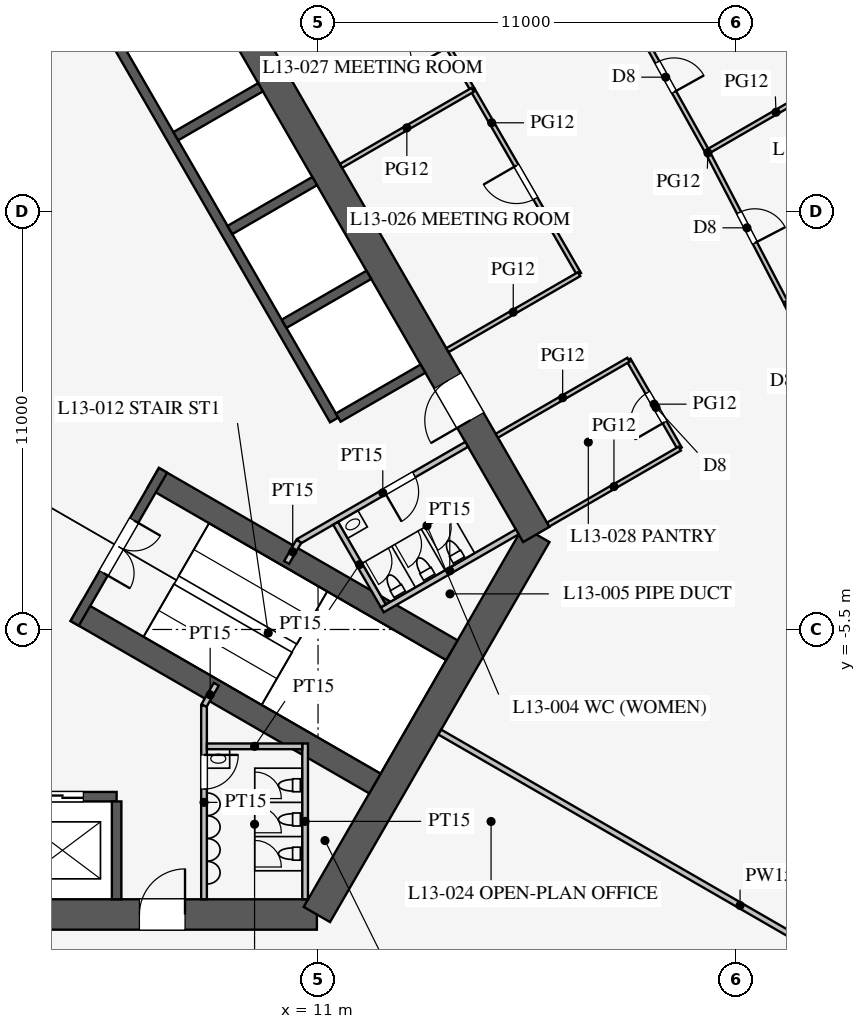
"""IFC4 building model, lengths in metres.
Left out: names, types, materials, properties, quantities, classifications, styles, units other than length and angle.
Written with IfcOpenShell. Run it as: python <this file> out.ifc"""

import sys

from ifc_helpers import new_model, si_unit, direction, frame, frame_2d, origin, place, context, subcontext, project, spatial, rectangle, extrude, element, fill, save


model = new_model("IFC4")
c1 = context("Model", 3, precision=1e-05, world=origin(), true_north=direction((0.0, 1.0)))
c2 = subcontext(c1, "Body", "Model", "MODEL_VIEW")
j1 = project(units=[si_unit("LENGTHUNIT", "METRE"), si_unit("PLANEANGLEUNIT", "RADIAN")], contexts=[c1])
p1 = place(None, origin())
s1 = spatial("IfcSite", under=j1, at=p1, CompositionType="ELEMENT")
p2 = place(p1, origin())
s2 = spatial("IfcBuilding", under=s1, at=p2, CompositionType="ELEMENT")
p3 = place(p2, frame((0.0, 0.0, 58.5)))
s3 = spatial("IfcBuildingStorey", under=s2, at=p3, CompositionType="ELEMENT", Elevation=58.5)
p4 = place(p3, frame((-10.97, -13.0, 0.0), z_axis=(0.0, 0.0, 1.0), x_axis=(1.0, 0.0, 0.0)))
e1 = element("IfcWall", 1, at=p4, inside=s3, PredefinedType="SHEAR", context=c2, shape_type="SweptSolid", body=[
    extrude(rectangle(XDim=21.939, YDim=0.8, at=frame_2d((10.97, 0.0))), origin(), (0.0, 0.0, 1.0), 4.2),
])
p5 = place(p4, frame((17.27, 0.0, 0.0)))
e2 = element("IfcOpeningElement", 2, at=p5, cuts=e1, PredefinedType="OPENING", context=c2, shape_type="SweptSolid", body=[
    extrude(rectangle(XDim=1.2, YDim=2.1, at=frame_2d((0.6, 1.05))), frame((0.0, 0.41, 0.0), z_axis=(0.0, -1.0, 0.0), x_axis=(1.0, 0.0, 0.0)), (0.0, 0.0, 1.0), 0.82),
])
p6 = place(p4, frame((3.47, 0.0, 0.0)))
e3 = element("IfcOpeningElement", 3, at=p6, cuts=e1, PredefinedType="OPENING", context=c2, shape_type="SweptSolid", body=[
    extrude(rectangle(XDim=1.2, YDim=2.1, at=frame_2d((0.6, 1.05))), frame((0.0, 0.41, 0.0), z_axis=(0.0, -1.0, 0.0), x_axis=(1.0, 0.0, 0.0)), (0.0, 0.0, 1.0), 0.82),
])
p7 = place(p3, frame((10.97, -13.0, 0.0), z_axis=(0.0, 0.0, 1.0), x_axis=(0.499995765644, 0.866027848477, 0.0)))
e4 = element("IfcWall", 4, at=p7, inside=s3, PredefinedType="SHEAR", context=c2, shape_type="SweptSolid", body=[
    extrude(rectangle(XDim=11.547, YDim=0.8, at=frame_2d((5.773, 0.0))), origin(), (0.0, 0.0, 1.0), 4.2),
])
p8 = place(p3, frame((16.743, -3.0, 0.0), z_axis=(0.0, 0.0, 1.0), x_axis=(-0.500002442456, 0.866023993627, 0.0)))
e5 = element("IfcWall", 5, at=p8, inside=s3, PredefinedType="SHEAR", context=c2, shape_type="SweptSolid", body=[
    extrude(rectangle(XDim=21.939, YDim=0.8, at=frame_2d((10.97, 0.0))), origin(), (0.0, 0.0, 1.0), 4.2),
])
p9 = place(p8, frame((17.27, 0.0, 0.0)))
e6 = element("IfcOpeningElement", 6, at=p9, cuts=e5, PredefinedType="OPENING", context=c2, shape_type="SweptSolid", body=[
    extrude(rectangle(XDim=1.2, YDim=2.1, at=frame_2d((0.6, 1.05))), frame((0.0, 0.41, 0.0), z_axis=(0.0, -1.0, 0.0), x_axis=(1.0, 0.0, 0.0)), (0.0, 0.0, 1.0), 0.82),
])
p10 = place(p8, frame((3.47, 0.0, 0.0)))
e7 = element("IfcOpeningElement", 7, at=p10, cuts=e5, PredefinedType="OPENING", context=c2, shape_type="SweptSolid", body=[
    extrude(rectangle(XDim=1.2, YDim=2.1, at=frame_2d((0.6, 1.05))), frame((0.0, 0.41, 0.0), z_axis=(0.0, -1.0, 0.0), x_axis=(1.0, 0.0, 0.0)), (0.0, 0.0, 1.0), 0.82),
])
p11 = place(p3, frame((-5.7, -9.9, 0.0), z_axis=(0.0, 0.0, 1.0), x_axis=(1.0, 0.0, 0.0)))
e8 = element("IfcWall", 8, at=p11, inside=s3, PredefinedType="SHEAR", context=c2, shape_type="SweptSolid", body=[
    extrude(rectangle(XDim=11.4, YDim=0.25, at=frame_2d((5.7, 0.0))), origin(), (0.0, 0.0, 1.0), 4.2),
])
p12 = place(p11, frame((0.875, 0.0, 0.0)))
e9 = element("IfcOpeningElement", 9, at=p12, cuts=e8, PredefinedType="OPENING", context=c2, shape_type="SweptSolid", body=[
    extrude(rectangle(XDim=1.1, YDim=2.2, at=frame_2d((0.55, 1.1))), frame((0.0, 0.135, 0.0), z_axis=(0.0, -1.0, 0.0), x_axis=(1.0, 0.0, 0.0)), (0.0, 0.0, 1.0), 0.27),
])
p13 = place(p11, frame((3.725, 0.0, 0.0)))
e10 = element("IfcOpeningElement", 10, at=p13, cuts=e8, PredefinedType="OPENING", context=c2, shape_type="SweptSolid", body=[
    extrude(rectangle(XDim=1.1, YDim=2.2, at=frame_2d((0.55, 1.1))), frame((0.0, 0.135, 0.0), z_axis=(0.0, -1.0, 0.0), x_axis=(1.0, 0.0, 0.0)), (0.0, 0.0, 1.0), 0.27),
])
p14 = place(p11, frame((6.575, 0.0, 0.0)))
e11 = element("IfcOpeningElement", 11, at=p14, cuts=e8, PredefinedType="OPENING", context=c2, shape_type="SweptSolid", body=[
    extrude(rectangle(XDim=1.1, YDim=2.2, at=frame_2d((0.55, 1.1))), frame((0.0, 0.135, 0.0), z_axis=(0.0, -1.0, 0.0), x_axis=(1.0, 0.0, 0.0)), (0.0, 0.0, 1.0), 0.27),
])
p15 = place(p11, frame((9.425, 0.0, 0.0)))
e12 = element("IfcOpeningElement", 12, at=p15, cuts=e8, PredefinedType="OPENING", context=c2, shape_type="SweptSolid", body=[
    extrude(rectangle(XDim=1.1, YDim=2.2, at=frame_2d((0.55, 1.1))), frame((0.0, 0.135, 0.0), z_axis=(0.0, -1.0, 0.0), x_axis=(1.0, 0.0, 0.0)), (0.0, 0.0, 1.0), 0.27),
])
p16 = place(p3, frame((5.7, -10.025, 0.0), z_axis=(0.0, 0.0, 1.0), x_axis=(0.0, -1.0, 0.0)))
e13 = element("IfcWall", 13, at=p16, inside=s3, PredefinedType="SHEAR", context=c2, shape_type="SweptSolid", body=[
    extrude(rectangle(XDim=2.575, YDim=0.25, at=frame_2d((1.288, 0.0))), origin(), (0.0, 0.0, 1.0), 4.2),
])
p17 = place(p3, frame((11.424, 0.014, 0.0), z_axis=(0.0, 0.0, 1.0), x_axis=(-0.500001763848, 0.866024385424, 0.0)))
e14 = element("IfcWall", 14, at=p17, inside=s3, PredefinedType="SHEAR", context=c2, shape_type="SweptSolid", body=[
    extrude(rectangle(XDim=11.4, YDim=0.25, at=frame_2d((5.7, 0.0))), origin(), (0.0, 0.0, 1.0), 4.2),
])
for number, where, z_axis, x_axis in (
    (15, (11.532, 0.076, 0.0), (0.0, 0.0, 1.0), (0.866, 0.5, 0.0)),
    (16, (10.107, 2.544, 0.0), (0.0, 0.0, 1.0), (0.866, 0.5, 0.0)),
    (17, (8.682, 5.012, 0.0), (0.0, 0.0, 1.0), (0.866, 0.5, 0.0)),
    (18, (7.257, 7.481, 0.0), (0.0, 0.0, 1.0), (0.866, 0.5, 0.0)),
):
    element("IfcWall", number, at=place(p3, frame(where, z_axis=z_axis, x_axis=x_axis)), inside=s3, PredefinedType="SHEAR", context=c2, shape_type="SweptSolid", body=[
        extrude(rectangle(XDim=2.575, YDim=0.25, at=frame_2d((1.288, 0.0))), origin(), (0.0, 0.0, 1.0), 4.2),
    ])
for number, where, z_axis, x_axis in (
    (19, (4.638, -5.016, 0.0), (0.0, 0.0, 1.0), (0.866, -0.5, 0.0)),
    (20, (6.663, -1.509, 0.0), (0.0, 0.0, 1.0), (0.866, -0.5, 0.0)),
):
    element("IfcWall", number, at=place(p3, frame(where, z_axis=z_axis, x_axis=x_axis)), inside=s3, PredefinedType="SHEAR", context=c2, shape_type="SweptSolid", body=[
        extrude(rectangle(XDim=9.075, YDim=0.6, at=frame_2d((4.538, 0.0))), origin(), (0.0, 0.0, 1.0), 4.2),
    ])
p18 = place(p3, frame((4.597, -5.339, 0.0), z_axis=(0.0, 0.0, 1.0), x_axis=(0.499984536904, 0.866034331223, 0.0)))
e21 = element("IfcWall", 21, at=p18, inside=s3, PredefinedType="SHEAR", context=c2, shape_type="SweptSolid", body=[
    extrude(rectangle(XDim=4.65, YDim=0.25, at=frame_2d((2.325, 0.0))), origin(), (0.0, 0.0, 1.0), 4.2),
])
p19 = place(p18, frame((1.525, 0.0, 0.0)))
e22 = element("IfcOpeningElement", 22, at=p19, cuts=e21, PredefinedType="OPENING", context=c2, shape_type="SweptSolid", body=[
    extrude(rectangle(XDim=1.6, YDim=2.1, at=frame_2d((0.8, 1.05))), frame((0.0, 0.135, 0.0), z_axis=(0.0, -1.0, 0.0), x_axis=(1.0, 0.0, 0.0)), (0.0, 0.0, 1.0), 0.27),
])
p20 = place(p3, frame((8.0, -7.5, 0.0), z_axis=(0.0, 0.0, 1.0), x_axis=(0.0, -1.0, 0.0)))
e23 = element("IfcWall", 23, at=p20, inside=s3, PredefinedType="PARTITIONING", context=c2, shape_type="SweptSolid", body=[
    extrude(rectangle(XDim=5.1, YDim=0.15, at=frame_2d((2.55, 0.0))), origin(), (0.0, 0.0, 1.0), 4.0),
])
p21 = place(p20, frame((1.3, 0.0, 0.0)))
e24 = element("IfcOpeningElement", 24, at=p21, cuts=e23, PredefinedType="OPENING", context=c2, shape_type="SweptSolid", body=[
    extrude(rectangle(XDim=0.9, YDim=2.1, at=frame_2d((0.45, 1.05))), frame((0.0, 0.085, 0.0), z_axis=(0.0, -1.0, 0.0), x_axis=(1.0, 0.0, 0.0)), (0.0, 0.0, 1.0), 0.17),
])
p22 = place(p3, frame((10.495, -3.178, 0.0), z_axis=(0.0, 0.0, 1.0), x_axis=(0.86602216432, 0.500005610874, 0.0)))
e25 = element("IfcWall", 25, at=p22, inside=s3, PredefinedType="PARTITIONING", context=c2, shape_type="SweptSolid", body=[
    extrude(rectangle(XDim=5.1, YDim=0.15, at=frame_2d((2.55, 0.0))), origin(), (0.0, 0.0, 1.0), 4.0),
])
p23 = place(p22, frame((2.6, 0.0, 0.0)))
e26 = element("IfcOpeningElement", 26, at=p23, cuts=e25, PredefinedType="OPENING", context=c2, shape_type="SweptSolid", body=[
    extrude(rectangle(XDim=0.9, YDim=2.1, at=frame_2d((0.45, 1.05))), frame((0.0, 0.085, 0.0), z_axis=(0.0, -1.0, 0.0), x_axis=(1.0, 0.0, 0.0)), (0.0, 0.0, 1.0), 0.17),
])
for number, where, z_axis, x_axis in (
    (27, (8.0, -7.5, 0.0), (0.0, 0.0, 1.0), (0.5, 0.866, 0.0)),
    (28, (10.495, -3.178, 0.0), (0.0, 0.0, 1.0), (-0.5, -0.866, 0.0)),
):
    element("IfcWall", number, at=place(p3, frame(where, z_axis=z_axis, x_axis=x_axis)), inside=s3, PredefinedType="PARTITIONING", context=c2, shape_type="SweptSolid", body=[
        extrude(rectangle(XDim=0.645, YDim=0.15, at=frame_2d((0.323, 0.0))), origin(), (0.0, 0.0, 1.0), 4.0),
    ])
p24 = place(p3, frame((10.66, -8.5, 0.0), z_axis=(0.0, 0.0, 1.0), x_axis=(0.0, -1.0, 0.0)))
e29 = element("IfcWall", 29, at=p24, inside=s3, PredefinedType="PARTITIONING", context=c2, shape_type="SweptSolid", body=[
    extrude(rectangle(XDim=4.1, YDim=0.15, at=frame_2d((2.05, 0.0))), origin(), (0.0, 0.0, 1.0), 4.0),
])
p25 = place(p3, frame((8.075, -8.575, 0.0), z_axis=(0.0, 0.0, 1.0), x_axis=(1.0, 0.0, 0.0)))
e30 = element("IfcWall", 30, at=p25, inside=s3, PredefinedType="PARTITIONING", context=c2, shape_type="SweptSolid", body=[
    extrude(rectangle(XDim=2.51, YDim=0.15, at=frame_2d((1.255, 0.0))), origin(), (0.0, 0.0, 1.0), 4.0),
])
p26 = place(p3, frame((12.691, -4.982, 0.0), z_axis=(0.0, 0.0, 1.0), x_axis=(0.8660249478, 0.500000789788, 0.0)))
e31 = element("IfcWall", 31, at=p26, inside=s3, PredefinedType="PARTITIONING", context=c2, shape_type="SweptSolid", body=[
    extrude(rectangle(XDim=4.1, YDim=0.15, at=frame_2d((2.05, 0.0))), origin(), (0.0, 0.0, 1.0), 4.0),
])
p27 = place(p3, frame((11.464, -2.706, 0.0), z_axis=(0.0, 0.0, 1.0), x_axis=(0.50001992892, -0.866013897511, 0.0)))
e32 = element("IfcWall", 32, at=p27, inside=s3, PredefinedType="PARTITIONING", context=c2, shape_type="SweptSolid", body=[
    extrude(rectangle(XDim=2.51, YDim=0.15, at=frame_2d((1.255, 0.0))), origin(), (0.0, 0.0, 1.0), 4.0),
])
p28 = place(p3, frame((14.203, -8.2, 0.0), z_axis=(0.0, 0.0, 1.0), x_axis=(0.866024965723, -0.500000758745, 0.0)))
e33 = element("IfcWall", 33, at=p28, inside=s3, PredefinedType="PARTITIONING", context=c2, shape_type="SweptSolid", body=[
    extrude(rectangle(XDim=18.25, YDim=0.15, at=frame_2d((9.125, 0.0))), origin(), (0.0, 0.0, 1.0), 2.3),
])
p29 = place(p3, frame((15.069, 8.7, 0.0), z_axis=(0.0, 0.0, 1.0), x_axis=(-0.500012057535, 0.866018442252, 0.0)))
e34 = element("IfcWall", 34, at=p29, inside=s3, PredefinedType="PARTITIONING", context=c2, shape_type="SweptSolid", body=[
    extrude(rectangle(XDim=3.6, YDim=0.12, at=frame_2d((1.8, 0.0))), origin(), (0.0, 0.0, 1.0), 2.9),
])
p30 = place(p29, frame((1.3, 0.0, 0.15)))
e35 = element("IfcOpeningElement", 35, at=p30, cuts=e34, PredefinedType="OPENING", context=c2, shape_type="SweptSolid", body=[
    extrude(rectangle(XDim=1.0, YDim=2.1, at=frame_2d((0.5, 1.05))), frame((0.0, 0.07, 0.0), z_axis=(0.0, -1.0, 0.0), x_axis=(1.0, 0.0, 0.0)), (0.0, 0.0, 1.0), 0.14),
])
p31 = place(p3, frame((20.519, -0.74, 0.0), z_axis=(0.0, 0.0, 1.0), x_axis=(-0.4999416173, 0.866059108428, 0.0)))
e36 = element("IfcWall", 36, at=p31, inside=s3, PredefinedType="PARTITIONING", context=c2, shape_type="SweptSolid", body=[
    extrude(rectangle(XDim=2.7, YDim=0.12, at=frame_2d((1.35, 0.0))), origin(), (0.0, 0.0, 1.0), 2.9),
])
p32 = place(p31, frame((0.8, 0.0, 0.15)))
e37 = element("IfcOpeningElement", 37, at=p32, cuts=e36, PredefinedType="OPENING", context=c2, shape_type="SweptSolid", body=[
    extrude(rectangle(XDim=0.9, YDim=2.1, at=frame_2d((0.45, 1.05))), frame((0.0, 0.07, 0.0), z_axis=(0.0, -1.0, 0.0), x_axis=(1.0, 0.0, 0.0)), (0.0, 0.0, 1.0), 0.14),
])
p33 = place(p3, frame((17.869, 3.85, 0.0), z_axis=(0.0, 0.0, 1.0), x_axis=(-0.500016814911, 0.866015695474, 0.0)))
e38 = element("IfcWall", 38, at=p33, inside=s3, PredefinedType="PARTITIONING", context=c2, shape_type="SweptSolid", body=[
    extrude(rectangle(XDim=5.6, YDim=0.12, at=frame_2d((2.8, 0.0))), origin(), (0.0, 0.0, 1.0), 2.9),
])
p34 = place(p33, frame((2.3, 0.0, 0.15)))
e39 = element("IfcOpeningElement", 39, at=p34, cuts=e38, PredefinedType="OPENING", context=c2, shape_type="SweptSolid", body=[
    extrude(rectangle(XDim=1.0, YDim=2.1, at=frame_2d((0.5, 1.05))), frame((0.0, 0.07, 0.0), z_axis=(0.0, -1.0, 0.0), x_axis=(1.0, 0.0, 0.0)), (0.0, 0.0, 1.0), 0.14),
])
p35 = place(p3, frame((11.605, 6.7, 0.0), z_axis=(0.0, 0.0, 1.0), x_axis=(0.866026010844, 0.49999894854, 0.0)))
e40 = element("IfcWall", 40, at=p35, inside=s3, PredefinedType="PARTITIONING", context=c2, shape_type="SweptSolid", body=[
    extrude(rectangle(XDim=4.0, YDim=0.12, at=frame_2d((2.0, 0.0))), origin(), (0.0, 0.0, 1.0), 2.8),
])
for number, where, z_axis, x_axis in (
    (41, (17.055, -2.74, 0.0), (0.0, 0.0, 1.0), (0.866, 0.5, 0.0)),
    (42, (14.405, 1.85, 0.0), (0.0, 0.0, 1.0), (0.866, 0.5, 0.0)),
    (43, (15.705, -0.401, 0.0), (0.0, 0.0, 1.0), (0.866, 0.5, 0.0)),
):
    element("IfcWall", number, at=place(p3, frame(where, z_axis=z_axis, x_axis=x_axis)), inside=s3, PredefinedType="PARTITIONING", context=c2, shape_type="SweptSolid", body=[
        extrude(rectangle(XDim=4.0, YDim=0.12, at=frame_2d((2.0, 0.0))), origin(), (0.0, 0.0, 1.0), 2.9),
    ])
p36 = place(p3, frame((25.292, -0.986, 0.0), z_axis=(0.0, 0.0, 1.0), x_axis=(-0.435857917556, 0.900015486369, 0.0)))
e44 = element("IfcWall", 44, at=p36, inside=s3, PredefinedType="PARTITIONING", context=c2, shape_type="SweptSolid", body=[
    extrude(rectangle(XDim=4.512, YDim=0.12, at=frame_2d((2.256, 0.0))), origin(), (0.0, 0.0, 1.0), 2.9),
])
p37 = place(p36, frame((1.8, 0.0, 0.15)))
e45 = element("IfcOpeningElement", 45, at=p37, cuts=e44, PredefinedType="OPENING", context=c2, shape_type="SweptSolid", body=[
    extrude(rectangle(XDim=0.9, YDim=2.1, at=frame_2d((0.45, 1.05))), frame((0.0, 0.07, 0.0), z_axis=(0.0, -1.0, 0.0), x_axis=(1.0, 0.0, 0.0)), (0.0, 0.0, 1.0), 0.14),
])
p38 = place(p3, frame((21.245, 7.07, 0.0), z_axis=(0.0, 0.0, 1.0), x_axis=(-0.487373854787, 0.873193406795, 0.0)))
e46 = element("IfcWall", 46, at=p38, inside=s3, PredefinedType="PARTITIONING", context=c2, shape_type="SweptSolid", body=[
    extrude(rectangle(XDim=4.5, YDim=0.12, at=frame_2d((2.25, 0.0))), origin(), (0.0, 0.0, 1.0), 2.9),
])
p39 = place(p38, frame((1.8, 0.0, 0.15)))
e47 = element("IfcOpeningElement", 47, at=p39, cuts=e46, PredefinedType="OPENING", context=c2, shape_type="SweptSolid", body=[
    extrude(rectangle(XDim=0.9, YDim=2.1, at=frame_2d((0.45, 1.05))), frame((0.0, 0.07, 0.0), z_axis=(0.0, -1.0, 0.0), x_axis=(1.0, 0.0, 0.0)), (0.0, 0.0, 1.0), 0.14),
])
p40 = place(p3, frame((23.325, 3.074, 0.0), z_axis=(0.0, 0.0, 1.0), x_axis=(-0.461852697957, 0.886956642339, 0.0)))
e48 = element("IfcWall", 48, at=p40, inside=s3, PredefinedType="PARTITIONING", context=c2, shape_type="SweptSolid", body=[
    extrude(rectangle(XDim=4.504, YDim=0.12, at=frame_2d((2.252, 0.0))), origin(), (0.0, 0.0, 1.0), 2.9),
])
p41 = place(p40, frame((1.8, 0.0, 0.15)))
e49 = element("IfcOpeningElement", 49, at=p41, cuts=e48, PredefinedType="OPENING", context=c2, shape_type="SweptSolid", body=[
    extrude(rectangle(XDim=0.9, YDim=2.1, at=frame_2d((0.45, 1.05))), frame((0.0, 0.07, 0.0), z_axis=(0.0, -1.0, 0.0), x_axis=(1.0, 0.0, 0.0)), (0.0, 0.0, 1.0), 0.14),
])
p42 = place(p3, frame((21.245, 7.07, 0.0), z_axis=(0.0, 0.0, 1.0), x_axis=(0.866025669538, 0.499999539701, 0.0)))
e50 = element("IfcWall", 50, at=p42, inside=s3, PredefinedType="PARTITIONING", context=c2, shape_type="SweptSolid", body=[
    extrude(rectangle(XDim=4.169, YDim=0.12, at=frame_2d((2.085, 0.0))), origin(), (0.0, 0.0, 1.0), 2.8),
])
p43 = place(p3, frame((23.325, 3.074, 0.0), z_axis=(0.0, 0.0, 1.0), x_axis=(0.866009971343, 0.50002672882, 0.0)))
e51 = element("IfcWall", 51, at=p43, inside=s3, PredefinedType="PARTITIONING", context=c2, shape_type="SweptSolid", body=[
    extrude(rectangle(XDim=4.167, YDim=0.12, at=frame_2d((2.083, 0.0))), origin(), (0.0, 0.0, 1.0), 2.8),
])
p44 = place(p21, origin())
e52 = element("IfcDoor", 52, at=p44, inside=s3, OperationType="SINGLE_SWING_LEFT", PredefinedType="DOOR", context=c2, shape_type="SweptSolid", body=[
    extrude(rectangle(XDim=0.9, YDim=2.1, at=frame_2d((0.45, 1.05))), frame((0.0, 0.025, 0.0), z_axis=(0.0, -1.0, 0.0), x_axis=(1.0, 0.0, 0.0)), (0.0, 0.0, 1.0), 0.05),
])
fill(e24, e52)
p45 = place(p23, frame((0.9, 0.0, 0.0), z_axis=(0.0, 0.0, 1.0), x_axis=(-1.0, 0.0, 0.0)))
e53 = element("IfcDoor", 53, at=p45, inside=s3, OperationType="SINGLE_SWING_RIGHT", PredefinedType="DOOR", context=c2, shape_type="SweptSolid", body=[
    extrude(rectangle(XDim=0.9, YDim=2.1, at=frame_2d((0.45, 1.05))), frame((0.0, 0.025, 0.0), z_axis=(0.0, -1.0, 0.0), x_axis=(1.0, 0.0, 0.0)), (0.0, 0.0, 1.0), 0.05),
])
fill(e26, e53)
p46 = place(p19, frame((1.6, 0.0, 0.0), z_axis=(0.0, 0.0, 1.0), x_axis=(-1.0, 0.0, 0.0)))
e54 = element("IfcDoor", 54, at=p46, inside=s3, OperationType="DOUBLE_DOOR_SINGLE_SWING", PredefinedType="DOOR", context=c2, shape_type="SweptSolid", body=[
    extrude(rectangle(XDim=1.6, YDim=2.1, at=frame_2d((0.8, 1.05))), frame((0.0, 0.025, 0.0), z_axis=(0.0, -1.0, 0.0), x_axis=(1.0, 0.0, 0.0)), (0.0, 0.0, 1.0), 0.05),
])
fill(e22, e54)
p47 = place(p5, origin())
e55 = element("IfcDoor", 55, at=p47, inside=s3, OperationType="SINGLE_SWING_RIGHT", PredefinedType="DOOR", context=c2, shape_type="SweptSolid", body=[
    extrude(rectangle(XDim=1.2, YDim=2.1, at=frame_2d((0.6, 1.05))), frame((0.0, 0.025, 0.0), z_axis=(0.0, -1.0, 0.0), x_axis=(1.0, 0.0, 0.0)), (0.0, 0.0, 1.0), 0.05),
])
fill(e2, e55)
p48 = place(p10, origin())
e56 = element("IfcDoor", 56, at=p48, inside=s3, OperationType="SINGLE_SWING_LEFT", PredefinedType="DOOR", context=c2, shape_type="SweptSolid", body=[
    extrude(rectangle(XDim=1.2, YDim=2.1, at=frame_2d((0.6, 1.05))), frame((0.0, 0.025, 0.0), z_axis=(0.0, -1.0, 0.0), x_axis=(1.0, 0.0, 0.0)), (0.0, 0.0, 1.0), 0.05),
])
fill(e7, e56)
p49 = place(p34, origin())
e57 = element("IfcDoor", 57, at=p49, inside=s3, OperationType="SINGLE_SWING_RIGHT", PredefinedType="DOOR", context=c2, shape_type="SweptSolid", body=[
    extrude(rectangle(XDim=1.0, YDim=2.1, at=frame_2d((0.5, 1.05))), frame((0.0, 0.025, 0.0), z_axis=(0.0, -1.0, 0.0), x_axis=(1.0, 0.0, 0.0)), (0.0, 0.0, 1.0), 0.05),
])
fill(e39, e57)
p50 = place(p32, origin())
e58 = element("IfcDoor", 58, at=p50, inside=s3, OperationType="SINGLE_SWING_LEFT", PredefinedType="DOOR", context=c2, shape_type="SweptSolid", body=[
    extrude(rectangle(XDim=0.9, YDim=2.1, at=frame_2d((0.45, 1.05))), frame((0.0, 0.025, 0.0), z_axis=(0.0, -1.0, 0.0), x_axis=(1.0, 0.0, 0.0)), (0.0, 0.0, 1.0), 0.05),
])
fill(e37, e58)
p51 = place(p39, frame((0.9, 0.0, 0.0), z_axis=(0.0, 0.0, 1.0), x_axis=(-1.0, 0.0, 0.0)))
e59 = element("IfcDoor", 59, at=p51, inside=s3, OperationType="SINGLE_SWING_RIGHT", PredefinedType="DOOR", context=c2, shape_type="SweptSolid", body=[
    extrude(rectangle(XDim=0.9, YDim=2.1, at=frame_2d((0.45, 1.05))), frame((0.0, 0.025, 0.0), z_axis=(0.0, -1.0, 0.0), x_axis=(1.0, 0.0, 0.0)), (0.0, 0.0, 1.0), 0.05),
])
fill(e47, e59)
p52 = place(p41, frame((0.9, 0.0, 0.0), z_axis=(0.0, 0.0, 1.0), x_axis=(-1.0, 0.0, 0.0)))
e60 = element("IfcDoor", 60, at=p52, inside=s3, OperationType="SINGLE_SWING_RIGHT", PredefinedType="DOOR", context=c2, shape_type="SweptSolid", body=[
    extrude(rectangle(XDim=0.9, YDim=2.1, at=frame_2d((0.45, 1.05))), frame((0.0, 0.025, 0.0), z_axis=(0.0, -1.0, 0.0), x_axis=(1.0, 0.0, 0.0)), (0.0, 0.0, 1.0), 0.05),
])
fill(e49, e60)
p53 = place(p15, origin())
e61 = element("IfcDoor", 61, at=p53, inside=s3, OperationType="DOUBLE_DOOR_SLIDING", PredefinedType="DOOR", context=c2, shape_type="SweptSolid", body=[
    extrude(rectangle(XDim=1.1, YDim=2.2, at=frame_2d((0.55, 1.1))), frame((0.0, 0.025, 0.0), z_axis=(0.0, -1.0, 0.0), x_axis=(1.0, 0.0, 0.0)), (0.0, 0.0, 1.0), 0.05),
])
fill(e12, e61)
save(model, sys.argv[1])
